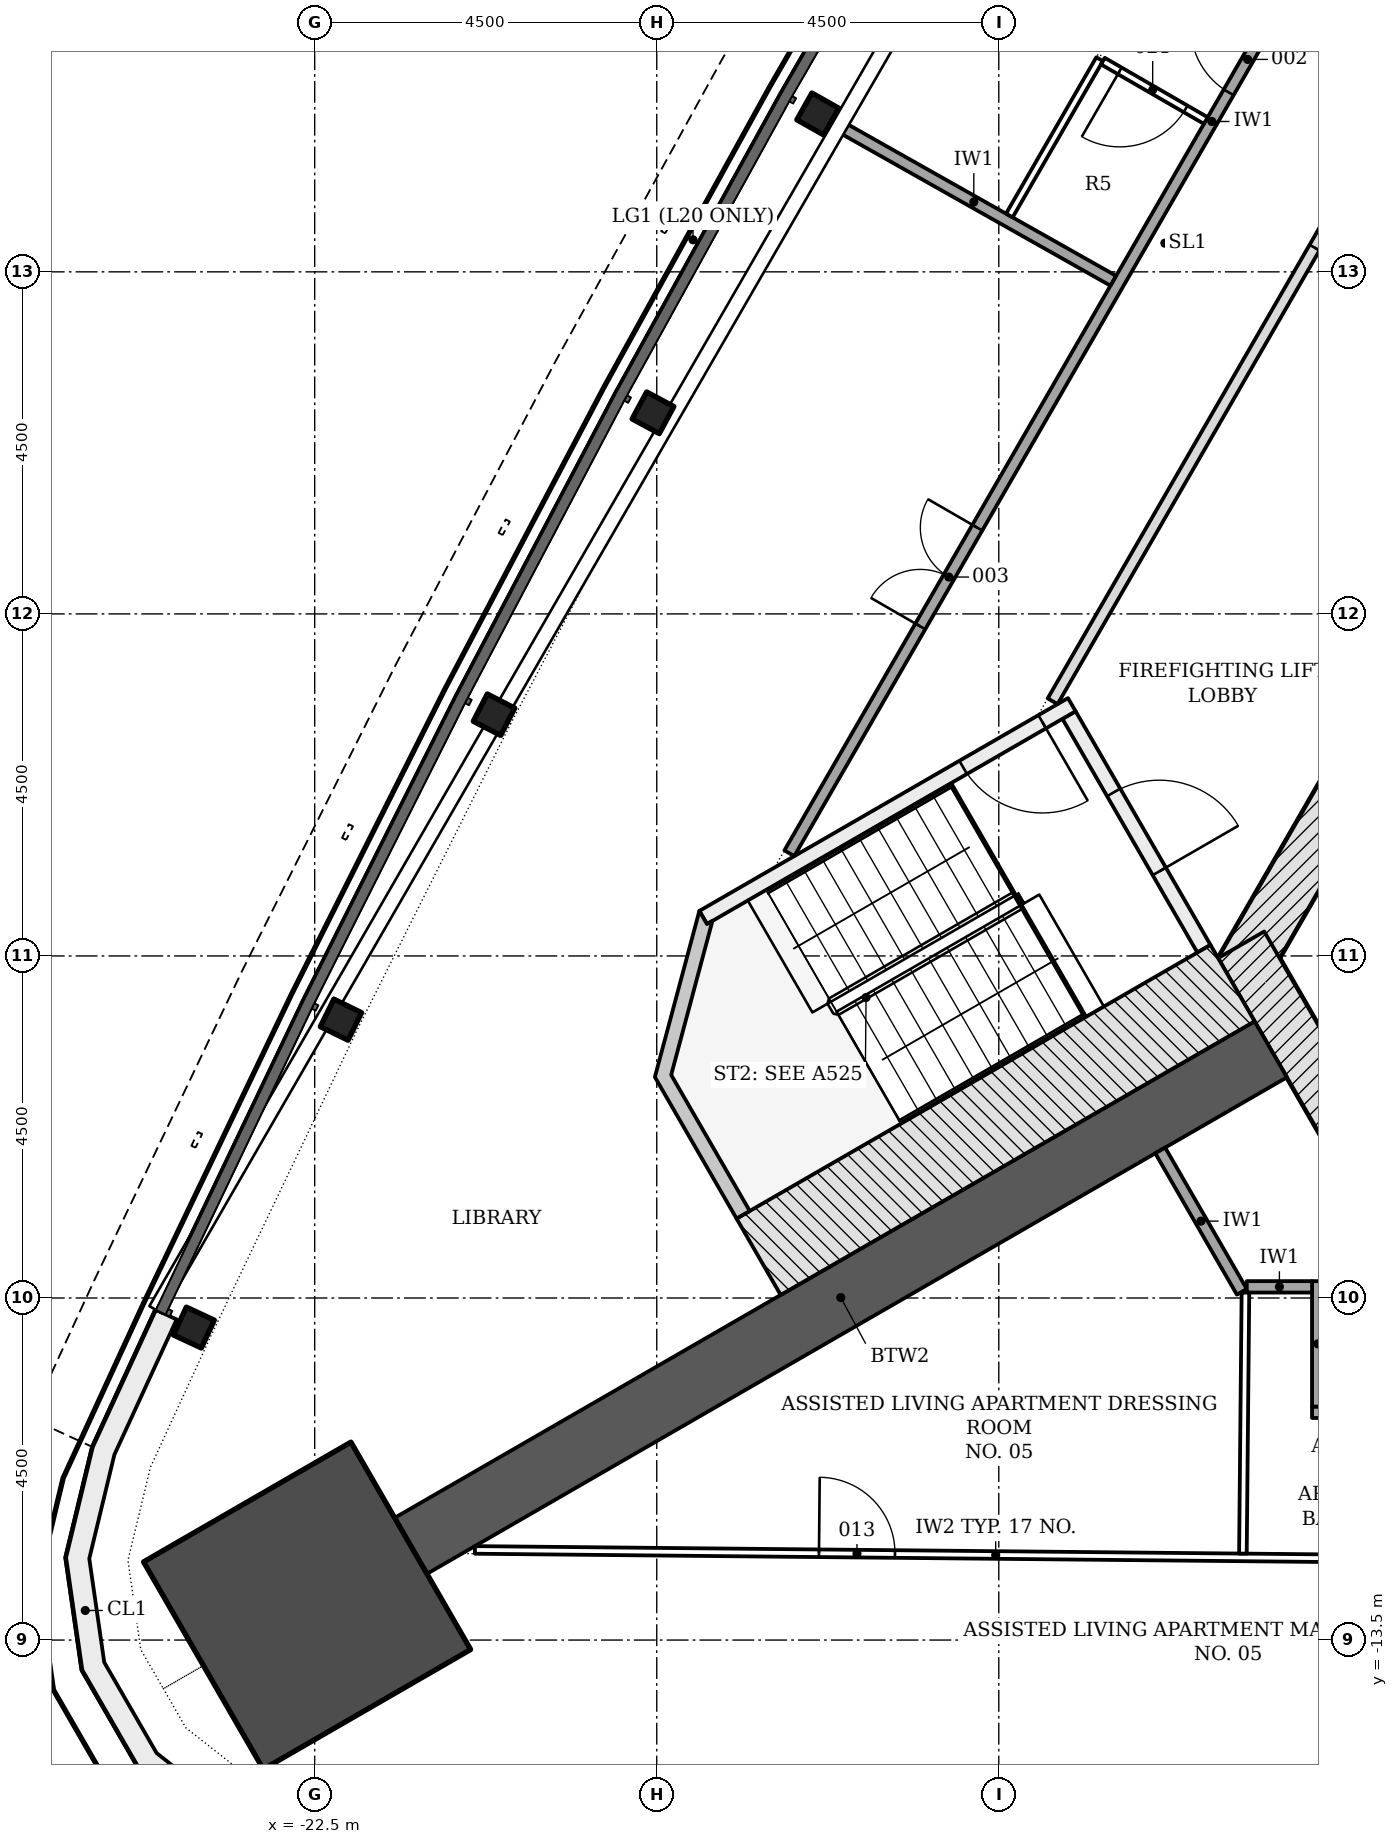
"""IFC4 building model, lengths in metres.
Left out: names, types, materials, properties, quantities, classifications, styles, units other than length and angle.
Written with IfcOpenShell. Run it as: python <this file> out.ifc"""

import sys

from ifc_helpers import new_model, si_unit, direction, frame, frame_2d, origin, origin_2d, place, context, subcontext, project, spatial, polyline, rectangle, i_section, outline, extrude, element, fill, save


model = new_model("IFC4")
c1 = context("Model", 3, precision=1e-05, world=origin(), true_north=direction((0.0, 1.0)))
c2 = subcontext(c1, "Body", "Model", "MODEL_VIEW")
j1 = project(units=[si_unit("LENGTHUNIT", "METRE"), si_unit("PLANEANGLEUNIT", "RADIAN")], contexts=[c1])
p1 = place(None, origin())
s1 = spatial("IfcSite", under=j1, at=p1, CompositionType="ELEMENT")
p2 = place(p1, origin())
s2 = spatial("IfcBuilding", under=s1, at=p2, CompositionType="ELEMENT")
p3 = place(p2, frame((0.0, 0.0, 79.8)))
s3 = spatial("IfcBuildingStorey", under=s2, at=p3, CompositionType="ELEMENT", Elevation=79.8)
p4 = place(p3, frame((-1.083, 11.281, -0.2), z_axis=(0.0, 0.0, 1.0), x_axis=(-0.500001446645, -0.866024568562, 0.0)))
e1 = element("IfcWall", 1, at=p4, inside=s3, PredefinedType="SHEAR", context=c2, shape_type="SweptSolid", body=[
    extrude(rectangle(XDim=18.458, YDim=0.7, at=frame_2d((9.229, 0.0))), origin(), (0.0, 0.0, 1.0), 3.6),
])
p5 = place(p4, frame((8.979, 0.0, 0.2)))
e2 = element("IfcOpeningElement", 2, at=p5, cuts=e1, PredefinedType="OPENING", context=c2, shape_type="SweptSolid", body=[
    extrude(rectangle(XDim=1.2, YDim=2.1, at=frame_2d((0.6, 1.05))), frame((0.0, 0.36, 0.0), z_axis=(0.0, -1.0, 0.0), x_axis=(1.0, 0.0, 0.0)), (0.0, 0.0, 1.0), 0.72),
])
p6 = place(p4, frame((11.029, 0.0, 0.2)))
e3 = element("IfcOpeningElement", 3, at=p6, cuts=e1, PredefinedType="OPENING", context=c2, shape_type="SweptSolid", body=[
    extrude(rectangle(XDim=1.2, YDim=2.1, at=frame_2d((0.6, 1.05))), frame((0.0, 0.36, 0.0), z_axis=(0.0, -1.0, 0.0), x_axis=(1.0, 0.0, 0.0)), (0.0, 0.0, 1.0), 0.72),
])
p7 = place(p3, frame((-10.311, -4.353, -0.2), z_axis=(0.0, 0.0, 1.0), x_axis=(0.500042739161, -0.866000726912, 0.0)))
e4 = element("IfcWall", 4, at=p7, inside=s3, PredefinedType="SHEAR", context=c2, shape_type="SweptSolid", body=[
    extrude(rectangle(XDim=2.771, YDim=0.7, at=frame_2d((1.386, 0.0))), origin(), (0.0, 0.0, 1.0), 3.6),
])
p8 = place(p3, frame((-9.922, -5.728, -0.2), z_axis=(0.0, 0.0, 1.0), x_axis=(-0.866026565165, -0.499997988424, 0.0)))
e5 = element("IfcWall", 5, at=p8, inside=s3, PredefinedType="SHEAR", context=c2, shape_type="SweptSolid", body=[
    extrude(rectangle(XDim=13.064, YDim=0.85, at=frame_2d((6.532, 0.0))), origin(), (0.0, 0.0, 1.0), 3.6),
])
p9 = place(p3, frame((-22.6, -13.048, -0.2), z_axis=(0.0, 0.0, 1.0), x_axis=(-0.866025403784, -0.5, 0.0)))
e6 = element("IfcColumn", 6, at=p9, inside=s3, PredefinedType="COLUMN", context=c2, shape_type="SweptSolid", body=[
    extrude(rectangle(XDim=3.15, YDim=3.15, at=origin_2d()), origin(), (0.0, 0.0, 1.0), 3.6),
])
for number, where, z_axis, x_axis in (
    (7, (-15.881, 6.577, -0.2), (0.0, 0.0, 1.0), (-0.492, -0.871, 0.0)),
    (8, (-18.05, 2.646, -0.2), (0.0, 0.0, 1.0), (-0.474, -0.88, 0.0)),
    (9, (-20.141, -1.326, -0.2), (0.0, 0.0, 1.0), (-0.457, -0.889, 0.0)),
    (10, (-22.155, -5.338, -0.2), (0.0, 0.0, 1.0), (-0.44, -0.898, 0.0)),
    (11, (-24.09, -9.389, -0.2), (0.0, 0.0, 1.0), (-0.422, -0.906, 0.0)),
):
    element("IfcColumn", number, at=place(p3, frame(where, z_axis=z_axis, x_axis=x_axis)), inside=s3, PredefinedType="COLUMN", context=c2, shape_type="SweptSolid", body=[
        extrude(i_section(OverallWidth=0.404, OverallDepth=0.406, WebThickness=0.027, FlangeThickness=0.044, FilletRadius=0.015, at=origin_2d()), origin(), (0.0, 0.0, 1.0), 3.6),
    ])
p10 = place(p3, origin())
e12 = element("IfcWall", 12, at=p10, inside=s3, PredefinedType="NOTDEFINED", context=c2, shape_type="SweptSolid", body=[
    extrude(outline(polyline([(-24.588, -9.157), (-25.42, -10.962), (-25.771, -12.414), (-25.558, -13.893), (-24.811, -15.187), (-23.636, -16.111), (-22.203, -16.533), (-20.224, -16.716), (-20.197, -16.417), (-22.146, -16.237), (-23.496, -15.84), (-24.58, -14.987), (-25.269, -13.793), (-25.466, -12.428), (-25.135, -11.061), (-24.316, -9.282), (-24.588, -9.157)])), origin(), (0.0, 0.0, 1.0), 3.3),
])
p11 = place(p3, frame((-12.576, -1.331, -0.2), z_axis=(0.0, 0.0, 1.0), x_axis=(0.499970499736, -0.8660424351, 0.0)))
e13 = element("IfcWall", 13, at=p11, inside=s3, PredefinedType="SHEAR", context=c2, shape_type="SweptSolid", body=[
    extrude(rectangle(XDim=3.55, YDim=0.2, at=frame_2d((1.775, 0.0))), origin(), (0.0, 0.0, 1.0), 3.6),
])
p12 = place(p11, frame((1.175, 0.0, 0.2)))
e14 = element("IfcOpeningElement", 14, at=p12, cuts=e13, PredefinedType="OPENING", context=c2, shape_type="SweptSolid", body=[
    extrude(rectangle(XDim=1.2, YDim=2.1, at=frame_2d((0.6, 1.05))), frame((0.0, 0.11, 0.0), z_axis=(0.0, -1.0, 0.0), x_axis=(1.0, 0.0, 0.0)), (0.0, 0.0, 1.0), 0.22),
])
p13 = place(p3, frame((-12.539, -1.194, -0.2), z_axis=(0.0, 0.0, 1.0), x_axis=(-0.866045472092, -0.499965239061, 0.0)))
e15 = element("IfcWall", 15, at=p13, inside=s3, PredefinedType="SHEAR", context=c2, shape_type="SweptSolid", body=[
    extrude(rectangle(XDim=5.6, YDim=0.2, at=frame_2d((2.8, 0.0))), origin(), (0.0, 0.0, 1.0), 3.6),
])
p14 = place(p13, frame((0.45, 0.0, 0.2)))
e16 = element("IfcOpeningElement", 16, at=p14, cuts=e15, PredefinedType="OPENING", context=c2, shape_type="SweptSolid", body=[
    extrude(rectangle(XDim=1.2, YDim=2.1, at=frame_2d((0.6, 1.05))), frame((0.0, 0.11, 0.0), z_axis=(0.0, -1.0, 0.0), x_axis=(1.0, 0.0, 0.0)), (0.0, 0.0, 1.0), 0.22),
])
p15 = place(p3, frame((-10.424, -4.858, -0.2), z_axis=(0.0, 0.0, 1.0), x_axis=(-0.866033125095, -0.499986626058, 0.0)))
e17 = element("IfcWall", 17, at=p15, inside=s3, PredefinedType="SHEAR", context=c2, shape_type="SweptSolid", body=[
    extrude(rectangle(XDim=7.2, YDim=1.161, at=frame_2d((3.6, 0.0))), origin(), (0.0, 0.0, 1.0), 3.6),
])
p16 = place(p3, frame((0.0, 0.0, -0.2)))
e18 = element("IfcWall", 18, at=p16, inside=s3, PredefinedType="SHEAR", context=c2, shape_type="SweptSolid", body=[
    extrude(outline(polyline([(-17.439, -3.907), (-18.025, -6.093), (-16.95, -7.955), (-16.777, -7.855), (-17.81, -6.065), (-17.267, -4.039), (-17.339, -4.081), (-17.339, -4.081), (-17.339, -4.081), (-17.339, -4.081), (-17.339, -4.081), (-17.339, -4.081), (-17.339, -4.081), (-17.339, -4.081), (-17.339, -4.081), (-17.339, -4.081), (-17.339, -4.081), (-17.339, -4.081), (-17.339, -4.081), (-17.339, -4.081), (-17.339, -4.081), (-17.339, -4.081), (-17.339, -4.081), (-17.439, -3.907)])), origin(), (0.0, 0.0, 1.0), 3.6),
])
p17 = place(p3, frame((-16.256, -3.149, 0.0), z_axis=(0.0, 0.0, 1.0), x_axis=(0.499999683919, 0.866025586274, 0.0)))
e19 = element("IfcWall", 19, at=p17, inside=s3, PredefinedType="PARTITIONING", context=c2, shape_type="SweptSolid", body=[
    extrude(rectangle(XDim=22.234, YDim=0.15, at=frame_2d((11.117, 0.0))), origin(), (0.0, 0.0, 1.0), 2.778),
])
p18 = place(p17, frame((13.553, 0.0, 0.0)))
e20 = element("IfcOpeningElement", 20, at=p18, cuts=e19, PredefinedType="OPENING", context=c2, shape_type="SweptSolid", body=[
    extrude(rectangle(XDim=1.0, YDim=2.1, at=frame_2d((0.5, 1.05))), frame((0.0, 0.085, 0.0), z_axis=(0.0, -1.0, 0.0), x_axis=(1.0, 0.0, 0.0)), (0.0, 0.0, 1.0), 0.17),
])
p19 = place(p17, frame((11.56, 0.0, 0.0)))
e21 = element("IfcOpeningElement", 21, at=p19, cuts=e19, PredefinedType="OPENING", context=c2, shape_type="SweptSolid", body=[
    extrude(rectangle(XDim=1.0, YDim=2.1, at=frame_2d((0.5, 1.05))), frame((0.0, 0.085, 0.0), z_axis=(0.0, -1.0, 0.0), x_axis=(1.0, 0.0, 0.0)), (0.0, 0.0, 1.0), 0.17),
])
p20 = place(p17, frame((3.446, 0.0, 0.0)))
e22 = element("IfcOpeningElement", 22, at=p20, cuts=e19, PredefinedType="OPENING", context=c2, shape_type="SweptSolid", body=[
    extrude(rectangle(XDim=1.5, YDim=2.1, at=frame_2d((0.75, 1.05))), frame((0.0, 0.085, 0.0), z_axis=(0.0, -1.0, 0.0), x_axis=(1.0, 0.0, 0.0)), (0.0, 0.0, 1.0), 0.17),
])
p21 = place(p3, frame((-4.407, 13.374, 0.0), z_axis=(0.0, 0.0, 1.0), x_axis=(-0.499997181693, -0.866027030928, 0.0)))
e23 = element("IfcWall", 23, at=p21, inside=s3, PredefinedType="PARTITIONING", context=c2, shape_type="SweptSolid", body=[
    extrude(rectangle(XDim=16.77, YDim=0.15, at=frame_2d((8.385, 0.0))), origin(), (0.0, 0.0, 1.0), 2.778),
])
p22 = place(p21, frame((8.879, 0.0, 0.0)))
e24 = element("IfcOpeningElement", 24, at=p22, cuts=e23, PredefinedType="OPENING", context=c2, shape_type="SweptSolid", body=[
    extrude(rectangle(XDim=1.0, YDim=2.1, at=frame_2d((0.5, 1.05))), frame((0.0, 0.085, 0.0), z_axis=(0.0, -1.0, 0.0), x_axis=(1.0, 0.0, 0.0)), (0.0, 0.0, 1.0), 0.17),
])
p23 = place(p3, frame((3.689, -10.503, 0.0), z_axis=(0.0, 0.0, 1.0), x_axis=(-1.0, 0.0, 0.0)))
e25 = element("IfcWall", 25, at=p23, inside=s3, PredefinedType="PARTITIONING", context=c2, shape_type="SweptSolid", body=[
    extrude(rectangle(XDim=13.068, YDim=0.15, at=frame_2d((6.534, 0.0))), origin(), (0.0, 0.0, 1.0), 2.778),
])
p24 = place(p23, frame((7.566, 0.0, 0.0)))
e26 = element("IfcOpeningElement", 26, at=p24, cuts=e25, PredefinedType="OPENING", context=c2, shape_type="SweptSolid", body=[
    extrude(rectangle(XDim=1.0, YDim=2.1, at=frame_2d((0.5, 1.05))), frame((0.0, 0.085, 0.0), z_axis=(0.0, -1.0, 0.0), x_axis=(1.0, 0.0, 0.0)), (0.0, 0.0, 1.0), 0.17),
])
p25 = place(p23, frame((2.5, 0.0, 0.0)))
e27 = element("IfcOpeningElement", 27, at=p25, cuts=e25, PredefinedType="OPENING", context=c2, shape_type="SweptSolid", body=[
    extrude(rectangle(XDim=1.0, YDim=2.1, at=frame_2d((0.5, 1.05))), frame((0.0, 0.085, 0.0), z_axis=(0.0, -1.0, 0.0), x_axis=(1.0, 0.0, 0.0)), (0.0, 0.0, 1.0), 0.17),
])
p26 = place(p3, frame((-11.376, -7.059, 0.0), z_axis=(0.0, 0.0, 1.0), x_axis=(0.500076779081, -0.865981070823, 0.0)))
e28 = element("IfcWall", 28, at=p26, inside=s3, PredefinedType="PARTITIONING", context=c2, shape_type="SweptSolid", body=[
    extrude(rectangle(XDim=2.147, YDim=0.15, at=frame_2d((1.074, 0.0))), origin(), (0.0, 0.0, 1.0), 2.778),
])
p27 = place(p3, frame((-9.304, -10.428, 0.0), z_axis=(0.0, 0.0, 1.0), x_axis=(0.0, 1.0, 0.0)))
e29 = element("IfcWall", 29, at=p27, inside=s3, PredefinedType="PARTITIONING", context=c2, shape_type="SweptSolid", body=[
    extrude(rectangle(XDim=1.65, YDim=0.15, at=frame_2d((0.825, 0.0))), origin(), (0.0, 0.0, 1.0), 3.4),
])
p28 = place(p3, frame((-10.238, -8.853, 0.0), z_axis=(0.0, 0.0, 1.0), x_axis=(1.0, 0.0, 0.0)))
e30 = element("IfcWall", 30, at=p28, inside=s3, PredefinedType="PARTITIONING", context=c2, shape_type="SweptSolid", body=[
    extrude(rectangle(XDim=0.859, YDim=0.15, at=frame_2d((0.43, 0.0))), origin(), (0.0, 0.0, 1.0), 3.4),
])
p29 = place(p3, frame((-15.663, 6.454, 0.0), z_axis=(0.0, 0.0, 1.0), x_axis=(0.870876717705, -0.491501518369, 0.0)))
e31 = element("IfcWall", 31, at=p29, inside=s3, PredefinedType="PARTITIONING", context=c2, shape_type="SweptSolid", body=[
    extrude(rectangle(XDim=4.213, YDim=0.15, at=frame_2d((2.106, 0.0))), origin(), (0.0, 0.0, 1.0), 2.778),
])
p30 = place(p3, frame((-20.393, -12.314, 0.0), z_axis=(0.0, 0.0, 1.0), x_axis=(0.999952690336, -0.009727131588, 0.0)))
e32 = element("IfcWall", 32, at=p30, inside=s3, PredefinedType="PARTITIONING", context=c2, shape_type="SweptSolid", body=[
    extrude(rectangle(XDim=13.704, YDim=0.1, at=frame_2d((6.852, 0.0))), origin(), (0.0, 0.0, 1.0), 2.778),
])
p31 = place(p30, frame((4.527, 0.0, 0.0)))
e33 = element("IfcOpeningElement", 33, at=p31, cuts=e32, PredefinedType="OPENING", context=c2, shape_type="SweptSolid", body=[
    extrude(rectangle(XDim=1.0, YDim=2.1, at=frame_2d((0.5, 1.05))), frame((0.0, 0.06, 0.0), z_axis=(0.0, -1.0, 0.0), x_axis=(1.0, 0.0, 0.0)), (0.0, 0.0, 1.0), 0.12),
])
p32 = place(p3, frame((-10.288, -12.363, 0.0), z_axis=(0.0, 0.0, 1.0), x_axis=(0.009740028537, 0.999952564797, 0.0)))
e34 = element("IfcWall", 34, at=p32, inside=s3, PredefinedType="PARTITIONING", context=c2, shape_type="SweptSolid", body=[
    extrude(rectangle(XDim=3.434, YDim=0.1, at=frame_2d((1.717, 0.0))), origin(), (0.0, 0.0, 1.0), 3.4),
])
p33 = place(p3, frame((-13.361, 5.241, 0.0), z_axis=(0.0, 0.0, 1.0), x_axis=(0.499965759324, 0.866045171745, 0.0)))
e35 = element("IfcWall", 35, at=p33, inside=s3, PredefinedType="PARTITIONING", context=c2, shape_type="SweptSolid", body=[
    extrude(rectangle(XDim=2.374, YDim=0.1, at=frame_2d((1.187, 0.0))), origin(), (0.0, 0.0, 1.0), 2.778),
])
p34 = place(p3, frame((-10.777, 6.491, 0.0), z_axis=(0.0, 0.0, 1.0), x_axis=(-0.865995788838, 0.500051291085, 0.0)))
e36 = element("IfcWall", 36, at=p34, inside=s3, PredefinedType="PARTITIONING", context=c2, shape_type="SweptSolid", body=[
    extrude(rectangle(XDim=1.564, YDim=0.1, at=frame_2d((0.782, 0.0))), origin(), (0.0, 0.0, 1.0), 3.4),
])
p35 = place(p34, frame((0.307, 0.0, 0.0)))
e37 = element("IfcOpeningElement", 37, at=p35, cuts=e36, PredefinedType="OPENING", context=c2, shape_type="SweptSolid", body=[
    extrude(rectangle(XDim=1.0, YDim=2.1, at=frame_2d((0.5, 1.05))), frame((0.0, 0.06, 0.0), z_axis=(0.0, -1.0, 0.0), x_axis=(1.0, 0.0, 0.0)), (0.0, 0.0, 1.0), 0.12),
])
p36 = place(p12, origin())
e38 = element("IfcDoor", 38, at=p36, inside=s3, OperationType="SINGLE_SWING_RIGHT", PredefinedType="DOOR", context=c2, shape_type="SweptSolid", body=[
    extrude(rectangle(XDim=1.2, YDim=2.1, at=frame_2d((0.6, 1.05))), frame((0.0, 0.025, 0.0), z_axis=(0.0, -1.0, 0.0), x_axis=(1.0, 0.0, 0.0)), (0.0, 0.0, 1.0), 0.05),
])
fill(e14, e38)
p37 = place(p14, origin())
e39 = element("IfcDoor", 39, at=p37, inside=s3, OperationType="SINGLE_SWING_LEFT", PredefinedType="DOOR", context=c2, shape_type="SweptSolid", body=[
    extrude(rectangle(XDim=1.2, YDim=2.1, at=frame_2d((0.6, 1.05))), frame((0.0, 0.025, 0.0), z_axis=(0.0, -1.0, 0.0), x_axis=(1.0, 0.0, 0.0)), (0.0, 0.0, 1.0), 0.05),
])
fill(e16, e39)
p38 = place(p19, origin())
e40 = element("IfcDoor", 40, at=p38, inside=s3, OperationType="SINGLE_SWING_RIGHT", PredefinedType="DOOR", context=c2, shape_type="SweptSolid", body=[
    extrude(rectangle(XDim=1.0, YDim=2.1, at=frame_2d((0.5, 1.05))), frame((0.0, 0.025, 0.0), z_axis=(0.0, -1.0, 0.0), x_axis=(1.0, 0.0, 0.0)), (0.0, 0.0, 1.0), 0.05),
])
fill(e21, e40)
p39 = place(p20, origin())
e41 = element("IfcDoor", 41, at=p39, inside=s3, OperationType="DOUBLE_DOOR_SINGLE_SWING", PredefinedType="DOOR", context=c2, shape_type="SweptSolid", body=[
    extrude(rectangle(XDim=1.5, YDim=2.1, at=frame_2d((0.75, 1.05))), frame((0.0, 0.025, 0.0), z_axis=(0.0, -1.0, 0.0), x_axis=(1.0, 0.0, 0.0)), (0.0, 0.0, 1.0), 0.05),
])
fill(e22, e41)
p40 = place(p22, origin())
e42 = element("IfcDoor", 42, at=p40, inside=s3, OperationType="SINGLE_SWING_RIGHT", PredefinedType="DOOR", context=c2, shape_type="SweptSolid", body=[
    extrude(rectangle(XDim=1.0, YDim=2.1, at=frame_2d((0.5, 1.05))), frame((0.0, 0.025, 0.0), z_axis=(0.0, -1.0, 0.0), x_axis=(1.0, 0.0, 0.0)), (0.0, 0.0, 1.0), 0.05),
])
fill(e24, e42)
p41 = place(p31, origin())
e43 = element("IfcDoor", 43, at=p41, inside=s3, OperationType="SINGLE_SWING_LEFT", PredefinedType="DOOR", context=c2, shape_type="SweptSolid", body=[
    extrude(rectangle(XDim=1.0, YDim=2.1, at=frame_2d((0.5, 1.05))), frame((0.0, 0.025, 0.0), z_axis=(0.0, -1.0, 0.0), x_axis=(1.0, 0.0, 0.0)), (0.0, 0.0, 1.0), 0.05),
])
fill(e33, e43)
p42 = place(p35, origin())
e44 = element("IfcDoor", 44, at=p42, inside=s3, OperationType="SINGLE_SWING_RIGHT", PredefinedType="DOOR", context=c2, shape_type="SweptSolid", body=[
    extrude(rectangle(XDim=1.0, YDim=2.1, at=frame_2d((0.5, 1.05))), frame((0.0, 0.025, 0.0), z_axis=(0.0, -1.0, 0.0), x_axis=(1.0, 0.0, 0.0)), (0.0, 0.0, 1.0), 0.05),
])
fill(e37, e44)
save(model, sys.argv[1])
